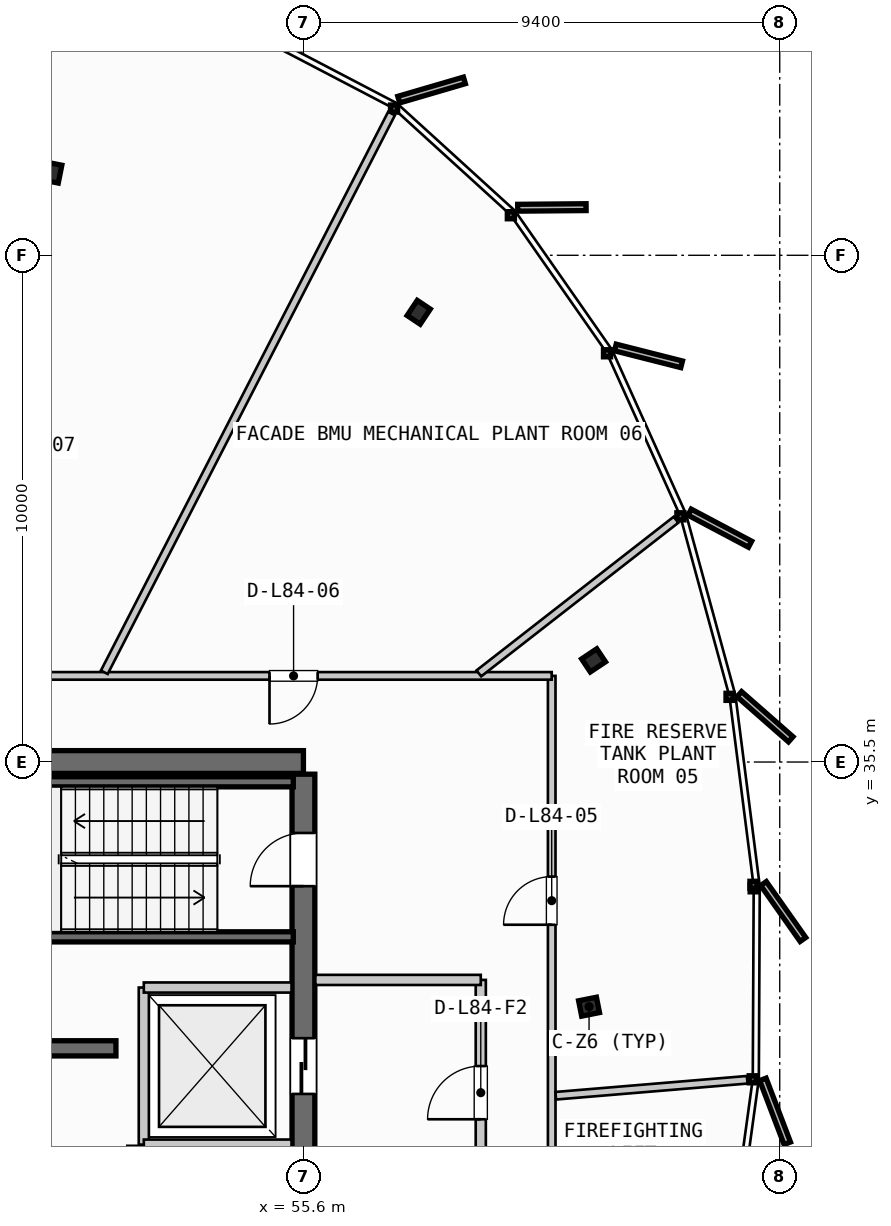
"""IFC4 building model, lengths in metres.
Left out: names, types, materials, properties, quantities, classifications, styles, units other than length and angle.
Written with IfcOpenShell. Run it as: python <this file> out.ifc"""

import sys

from ifc_helpers import new_model, si_unit, direction, frame, frame_2d, origin, origin_2d, place, context, subcontext, project, spatial, rectangle, i_section, extrude, source, transform, mapped, element, fill, save


model = new_model("IFC4")
c1 = context("Model", 3, precision=1e-05, world=origin(), true_north=direction((0.0, 1.0)))
c2 = subcontext(c1, "Body", "Model", "MODEL_VIEW")
j1 = project(units=[si_unit("LENGTHUNIT", "METRE"), si_unit("PLANEANGLEUNIT", "RADIAN")], contexts=[c1])
p1 = place(None, origin())
s1 = spatial("IfcSite", under=j1, at=p1, CompositionType="ELEMENT")
p2 = place(p1, origin())
s2 = spatial("IfcBuilding", under=s1, at=p2, CompositionType="ELEMENT")
p3 = place(p2, frame((0.0, 0.0, 316.3)))
s3 = spatial("IfcBuildingStorey", under=s2, at=p3, CompositionType="ELEMENT", Elevation=316.3)
p4 = place(p3, frame((55.6, 35.5, 0.0), z_axis=(0.0, 0.0, 1.0), x_axis=(-1.0, 0.0, 0.0)))
e1 = element("IfcWall", 1, at=p4, inside=s3, PredefinedType="SHEAR", context=c2, shape_type="SweptSolid", body=[
    extrude(rectangle(XDim=17.6, YDim=0.45, at=frame_2d((8.8, 0.0))), origin(), (0.0, 0.0, 1.0), 3.735),
])
p5 = place(p4, frame((8.05, 0.0, 0.0)))
e2 = element("IfcOpeningElement", 2, at=p5, cuts=e1, PredefinedType="OPENING", context=c2, shape_type="SweptSolid", body=[
    extrude(rectangle(XDim=1.5, YDim=2.2, at=frame_2d((0.75, 1.1))), frame((0.0, 0.235, 0.0), z_axis=(0.0, -1.0, 0.0), x_axis=(1.0, 0.0, 0.0)), (0.0, 0.0, 1.0), 0.47),
])
p6 = place(p4, frame((15.85, 0.0, 0.0)))
e3 = element("IfcOpeningElement", 3, at=p6, cuts=e1, PredefinedType="OPENING", context=c2, shape_type="SweptSolid", body=[
    extrude(rectangle(XDim=0.85, YDim=2.15, at=frame_2d((0.425, 1.075))), frame((0.0, 0.235, 0.0), z_axis=(0.0, -1.0, 0.0), x_axis=(1.0, 0.0, 0.0)), (0.0, 0.0, 1.0), 0.47),
])
p7 = place(p4, frame((14.35, 0.0, 0.0)))
e4 = element("IfcOpeningElement", 4, at=p7, cuts=e1, PredefinedType="OPENING", context=c2, shape_type="SweptSolid", body=[
    extrude(rectangle(XDim=0.85, YDim=2.15, at=frame_2d((0.425, 1.075))), frame((0.0, 0.235, 0.0), z_axis=(0.0, -1.0, 0.0), x_axis=(1.0, 0.0, 0.0)), (0.0, 0.0, 1.0), 0.47),
])
p8 = place(p4, frame((12.3, 0.0, 0.0)))
e5 = element("IfcOpeningElement", 5, at=p8, cuts=e1, PredefinedType="OPENING", context=c2, shape_type="SweptSolid", body=[
    extrude(rectangle(XDim=0.95, YDim=2.15, at=frame_2d((0.475, 1.075))), frame((0.0, 0.235, 0.0), z_axis=(0.0, -1.0, 0.0), x_axis=(1.0, 0.0, 0.0)), (0.0, 0.0, 1.0), 0.47),
])
p9 = place(p4, frame((10.2, 0.0, 0.0)))
e6 = element("IfcOpeningElement", 6, at=p9, cuts=e1, PredefinedType="OPENING", context=c2, shape_type="SweptSolid", body=[
    extrude(rectangle(XDim=0.9, YDim=2.15, at=frame_2d((0.45, 1.075))), frame((0.0, 0.235, 0.0), z_axis=(0.0, -1.0, 0.0), x_axis=(1.0, 0.0, 0.0)), (0.0, 0.0, 1.0), 0.47),
])
p10 = place(p3, frame((55.6, 20.34, 0.0), z_axis=(0.0, 0.0, 1.0), x_axis=(0.0, 1.0, 0.0)))
e7 = element("IfcWall", 7, at=p10, inside=s3, PredefinedType="SHEAR", context=c2, shape_type="SweptSolid", body=[
    extrude(rectangle(XDim=14.92, YDim=0.45, at=frame_2d((7.46, 0.0))), origin(), (0.0, 0.0, 1.0), 3.735),
])
p11 = place(p10, frame((12.71, 0.0, 0.0)))
e8 = element("IfcOpeningElement", 8, at=p11, cuts=e7, PredefinedType="OPENING", context=c2, shape_type="SweptSolid", body=[
    extrude(rectangle(XDim=1.05, YDim=2.15, at=frame_2d((0.525, 1.075))), frame((0.0, 0.235, 0.0), z_axis=(0.0, -1.0, 0.0), x_axis=(1.0, 0.0, 0.0)), (0.0, 0.0, 1.0), 0.47),
])
p12 = place(p10, frame((8.61, 0.0, 0.0)))
e9 = element("IfcOpeningElement", 9, at=p12, cuts=e7, PredefinedType="OPENING", context=c2, shape_type="SweptSolid", body=[
    extrude(rectangle(XDim=1.1, YDim=2.2, at=frame_2d((0.55, 1.1))), frame((0.0, 0.235, 0.0), z_axis=(0.0, -1.0, 0.0), x_axis=(1.0, 0.0, 0.0)), (0.0, 0.0, 1.0), 0.47),
])
p13 = place(p3, frame((47.65, 29.85, 0.0), z_axis=(0.0, 0.0, 1.0), x_axis=(1.0, 0.0, 0.0)))
e10 = element("IfcWall", 10, at=p13, inside=s3, PredefinedType="SHEAR", context=c2, shape_type="SweptSolid", body=[
    extrude(rectangle(XDim=4.25, YDim=0.3, at=frame_2d((2.125, 0.0))), origin(), (0.0, 0.0, 1.0), 3.735),
])
m1 = source(origin(), c2, "Body", "SweptSolid", [
    extrude(i_section(OverallWidth=0.309, OverallDepth=0.359, WebThickness=0.016, FlangeThickness=0.026, FilletRadius=0.027, at=origin_2d()), origin(), (0.0, 0.0, 1.0), 3.735),
])
for number, where, z_axis, x_axis in (
    (11, (61.237, 30.672, 0.0), (0.0, 0.0, 1.0), (0.981, 0.195, 0.0)),
    (12, (61.326, 37.506, 0.0), (0.0, 0.0, 1.0), (0.831, 0.556, 0.0)),
    (13, (57.875, 44.375, 0.0), (0.0, 0.0, 1.0), (0.556, 0.831, 0.0)),
    (14, (50.645, 47.132, 0.0), (0.0, 0.0, 1.0), (0.195, 0.981, 0.0)),
):
    element("IfcColumn", number, at=place(p3, frame(where, z_axis=z_axis, x_axis=x_axis)), inside=s3, PredefinedType="COLUMN", context=c2, shape_type="MappedRepresentation", body=[
        mapped(m1, transform((0.0, 0.0, 0.0), scale=1.0)),
    ])
for number, where, z_axis, x_axis in (
    (15, (48.05, 35.11, 0.0), (0.0, 0.0, 1.0), (1.0, 0.0, 0.0)),
    (16, (55.4, 32.05, 0.0), (0.0, 0.0, 1.0), (-1.0, 0.0, 0.0)),
):
    element("IfcWall", number, at=place(p3, frame(where, z_axis=z_axis, x_axis=x_axis)), inside=s3, PredefinedType="SHEAR", context=c2, shape_type="SweptSolid", body=[
        extrude(rectangle(XDim=7.35, YDim=0.2, at=frame_2d((3.675, 0.0))), origin(), (0.0, 0.0, 1.0), 3.735),
    ])
p14 = place(p3, frame((52.45, 27.95, 0.0), z_axis=(0.0, 0.0, 1.0), x_axis=(0.0, 1.0, 0.0)))
e17 = element("IfcWall", 17, at=p14, inside=s3, PredefinedType="PARTITIONING", context=c2, shape_type="SweptSolid", body=[
    extrude(rectangle(XDim=3.1, YDim=0.2, at=frame_2d((1.55, 0.0))), origin(), (0.0, 0.0, 1.0), 3.26),
])
for number, where, z_axis, x_axis in (
    (18, (52.45, 27.95, 0.0), (0.0, 0.0, 1.0), (1.0, 0.0, 0.0)),
    (19, (52.45, 31.05, 0.0), (0.0, 0.0, 1.0), (1.0, 0.0, 0.0)),
):
    element("IfcWall", number, at=place(p3, frame(where, z_axis=z_axis, x_axis=x_axis)), inside=s3, PredefinedType="PARTITIONING", context=c2, shape_type="SweptSolid", body=[
        extrude(rectangle(XDim=2.915, YDim=0.2, at=frame_2d((1.458, 0.0))), origin(), (0.0, 0.0, 1.0), 3.26),
    ])
p15 = place(p3, frame((59.1, 26.8, 0.0), z_axis=(0.0, 0.0, 1.0), x_axis=(0.0, 1.0, 0.0)))
e20 = element("IfcWall", 20, at=p15, inside=s3, PredefinedType="PARTITIONING", context=c2, shape_type="SweptSolid", body=[
    extrude(rectangle(XDim=4.4, YDim=0.2, at=frame_2d((2.2, 0.0))), origin(), (0.0, 0.0, 1.0), 3.26),
])
p16 = place(p15, frame((1.65, 0.0, 0.0)))
e21 = element("IfcOpeningElement", 21, at=p16, cuts=e20, PredefinedType="OPENING", context=c2, shape_type="SweptSolid", body=[
    extrude(rectangle(XDim=1.05, YDim=2.15, at=frame_2d((0.525, 1.075))), frame((0.0, 0.11, 0.0), z_axis=(0.0, -1.0, 0.0), x_axis=(1.0, 0.0, 0.0)), (0.0, 0.0, 1.0), 0.22),
])
p17 = place(p3, frame((55.835, 31.2, 0.0), z_axis=(0.0, 0.0, 1.0), x_axis=(1.0, 0.0, 0.0)))
e22 = element("IfcWall", 22, at=p17, inside=s3, PredefinedType="PARTITIONING", context=c2, shape_type="SweptSolid", body=[
    extrude(rectangle(XDim=3.265, YDim=0.2, at=frame_2d((1.633, 0.0))), origin(), (0.0, 0.0, 1.0), 3.26),
])
p18 = place(p3, frame((60.5, 18.4, 0.0), z_axis=(0.0, 0.0, 1.0), x_axis=(0.0, 1.0, 0.0)))
e23 = element("IfcWall", 23, at=p18, inside=s3, PredefinedType="PARTITIONING", context=c2, shape_type="SweptSolid", body=[
    extrude(rectangle(XDim=18.8, YDim=0.15, at=frame_2d((9.4, 0.0))), origin(), (0.0, 0.0, 1.0), 3.26),
])
p19 = place(p18, frame((4.269, 0.0, 0.0)))
e24 = element("IfcOpeningElement", 24, at=p19, cuts=e23, PredefinedType="OPENING", context=c2, shape_type="SweptSolid", body=[
    extrude(rectangle(XDim=0.95, YDim=2.15, at=frame_2d((0.475, 1.075))), frame((0.0, 0.085, 0.0), z_axis=(0.0, -1.0, 0.0), x_axis=(1.0, 0.0, 0.0)), (0.0, 0.0, 1.0), 0.17),
])
p20 = place(p18, frame((13.889, 0.0, 0.0)))
e25 = element("IfcOpeningElement", 25, at=p20, cuts=e23, PredefinedType="OPENING", context=c2, shape_type="SweptSolid", body=[
    extrude(rectangle(XDim=0.95, YDim=2.15, at=frame_2d((0.475, 1.075))), frame((0.0, 0.085, 0.0), z_axis=(0.0, -1.0, 0.0), x_axis=(1.0, 0.0, 0.0)), (0.0, 0.0, 1.0), 0.17),
])
p21 = place(p3, frame((60.5, 37.2, 0.0), z_axis=(0.0, 0.0, 1.0), x_axis=(-1.0, 0.0, 0.0)))
e26 = element("IfcWall", 26, at=p21, inside=s3, PredefinedType="PARTITIONING", context=c2, shape_type="SweptSolid", body=[
    extrude(rectangle(XDim=27.4, YDim=0.15, at=frame_2d((13.7, 0.0))), origin(), (0.0, 0.0, 1.0), 3.26),
])
p22 = place(p21, frame((4.619, 0.0, 0.0)))
e27 = element("IfcOpeningElement", 27, at=p22, cuts=e26, PredefinedType="OPENING", context=c2, shape_type="SweptSolid", body=[
    extrude(rectangle(XDim=0.95, YDim=2.15, at=frame_2d((0.475, 1.075))), frame((0.0, 0.085, 0.0), z_axis=(0.0, -1.0, 0.0), x_axis=(1.0, 0.0, 0.0)), (0.0, 0.0, 1.0), 0.17),
])
p23 = place(p21, frame((12.789, 0.0, 0.0)))
e28 = element("IfcOpeningElement", 28, at=p23, cuts=e26, PredefinedType="OPENING", context=c2, shape_type="SweptSolid", body=[
    extrude(rectangle(XDim=0.95, YDim=2.15, at=frame_2d((0.475, 1.075))), frame((0.0, 0.085, 0.0), z_axis=(0.0, -1.0, 0.0), x_axis=(1.0, 0.0, 0.0)), (0.0, 0.0, 1.0), 0.17),
])
p24 = place(p21, frame((20.101, 0.0, 0.0)))
e29 = element("IfcOpeningElement", 29, at=p24, cuts=e26, PredefinedType="OPENING", context=c2, shape_type="SweptSolid", body=[
    extrude(rectangle(XDim=0.95, YDim=2.15, at=frame_2d((0.475, 1.075))), frame((0.0, 0.085, 0.0), z_axis=(0.0, -1.0, 0.0), x_axis=(1.0, 0.0, 0.0)), (0.0, 0.0, 1.0), 0.17),
])
p25 = place(p3, frame((60.58, 28.914, 0.0), z_axis=(0.0, 0.0, 1.0), x_axis=(0.996539539042, 0.083120076554, 0.0)))
e30 = element("IfcWall", 30, at=p25, inside=s3, PredefinedType="PARTITIONING", context=c2, shape_type="SweptSolid", body=[
    extrude(rectangle(XDim=3.792, YDim=0.15, at=frame_2d((1.896, 0.0))), origin(), (0.0, 0.0, 1.0), 3.26),
])
p26 = place(p3, frame((59.062, 37.249, 0.0), z_axis=(0.0, 0.0, 1.0), x_axis=(0.788810886237, 0.614635978245, 0.0)))
e31 = element("IfcWall", 31, at=p26, inside=s3, PredefinedType="PARTITIONING", context=c2, shape_type="SweptSolid", body=[
    extrude(rectangle(XDim=4.933, YDim=0.15, at=frame_2d((2.466, 0.0))), origin(), (0.0, 0.0, 1.0), 3.26),
])
p27 = place(p3, frame((51.67, 37.271, 0.0), z_axis=(0.0, 0.0, 1.0), x_axis=(0.457212742862, 0.889357356615, 0.0)))
e32 = element("IfcWall", 32, at=p27, inside=s3, PredefinedType="PARTITIONING", context=c2, shape_type="SweptSolid", body=[
    extrude(rectangle(XDim=12.398, YDim=0.15, at=frame_2d((6.199, 0.0))), origin(), (0.0, 0.0, 1.0), 3.26),
])
m2 = source(origin(), c2, "Body", "SweptSolid", [
    extrude(rectangle(XDim=1.05, YDim=2.15, at=frame_2d((0.525, 1.075))), frame((0.0, 0.025, 0.0), z_axis=(0.0, -1.0, 0.0), x_axis=(1.0, 0.0, 0.0)), (0.0, 0.0, 1.0), 0.05),
])
p28 = place(p11, origin())
e33 = element("IfcDoor", 33, at=p28, inside=s3, OperationType="SINGLE_SWING_LEFT", PredefinedType="DOOR", context=c2, shape_type="MappedRepresentation", body=[
    mapped(m2, transform((0.0, 0.0, 0.0), scale=1.0)),
])
fill(e8, e33)
m3 = source(origin(), c2, "Body", "SweptSolid", [
    extrude(rectangle(XDim=1.1, YDim=2.2, at=frame_2d((0.55, 1.1))), frame((0.0, 0.025, 0.0), z_axis=(0.0, -1.0, 0.0), x_axis=(1.0, 0.0, 0.0)), (0.0, 0.0, 1.0), 0.05),
])
p29 = place(p12, origin())
e34 = element("IfcDoor", 34, at=p29, inside=s3, OperationType="SLIDING_TO_RIGHT", PredefinedType="DOOR", context=c2, shape_type="MappedRepresentation", body=[
    mapped(m3, transform((0.0, 0.0, 0.0), scale=1.0)),
])
fill(e9, e34)
p30 = place(p16, origin())
e35 = element("IfcDoor", 35, at=p30, inside=s3, OperationType="SINGLE_SWING_LEFT", PredefinedType="DOOR", context=c2, shape_type="MappedRepresentation", body=[
    mapped(m2, transform((0.0, 0.0, 0.0), scale=1.0)),
])
fill(e21, e35)
m4 = source(origin(), c2, "Body", "SweptSolid", [
    extrude(rectangle(XDim=0.95, YDim=2.15, at=frame_2d((0.475, 1.075))), frame((0.0, 0.025, 0.0), z_axis=(0.0, -1.0, 0.0), x_axis=(1.0, 0.0, 0.0)), (0.0, 0.0, 1.0), 0.05),
])
p31 = place(p20, origin())
e36 = element("IfcDoor", 36, at=p31, inside=s3, OperationType="SINGLE_SWING_LEFT", PredefinedType="DOOR", context=c2, shape_type="MappedRepresentation", body=[
    mapped(m4, transform((0.0, 0.0, 0.0), scale=1.0)),
])
fill(e25, e36)
p32 = place(p22, origin())
e37 = element("IfcDoor", 37, at=p32, inside=s3, OperationType="SINGLE_SWING_RIGHT", PredefinedType="DOOR", context=c2, shape_type="MappedRepresentation", body=[
    mapped(m4, transform((0.0, 0.0, 0.0), scale=1.0)),
])
fill(e27, e37)
save(model, sys.argv[1])
